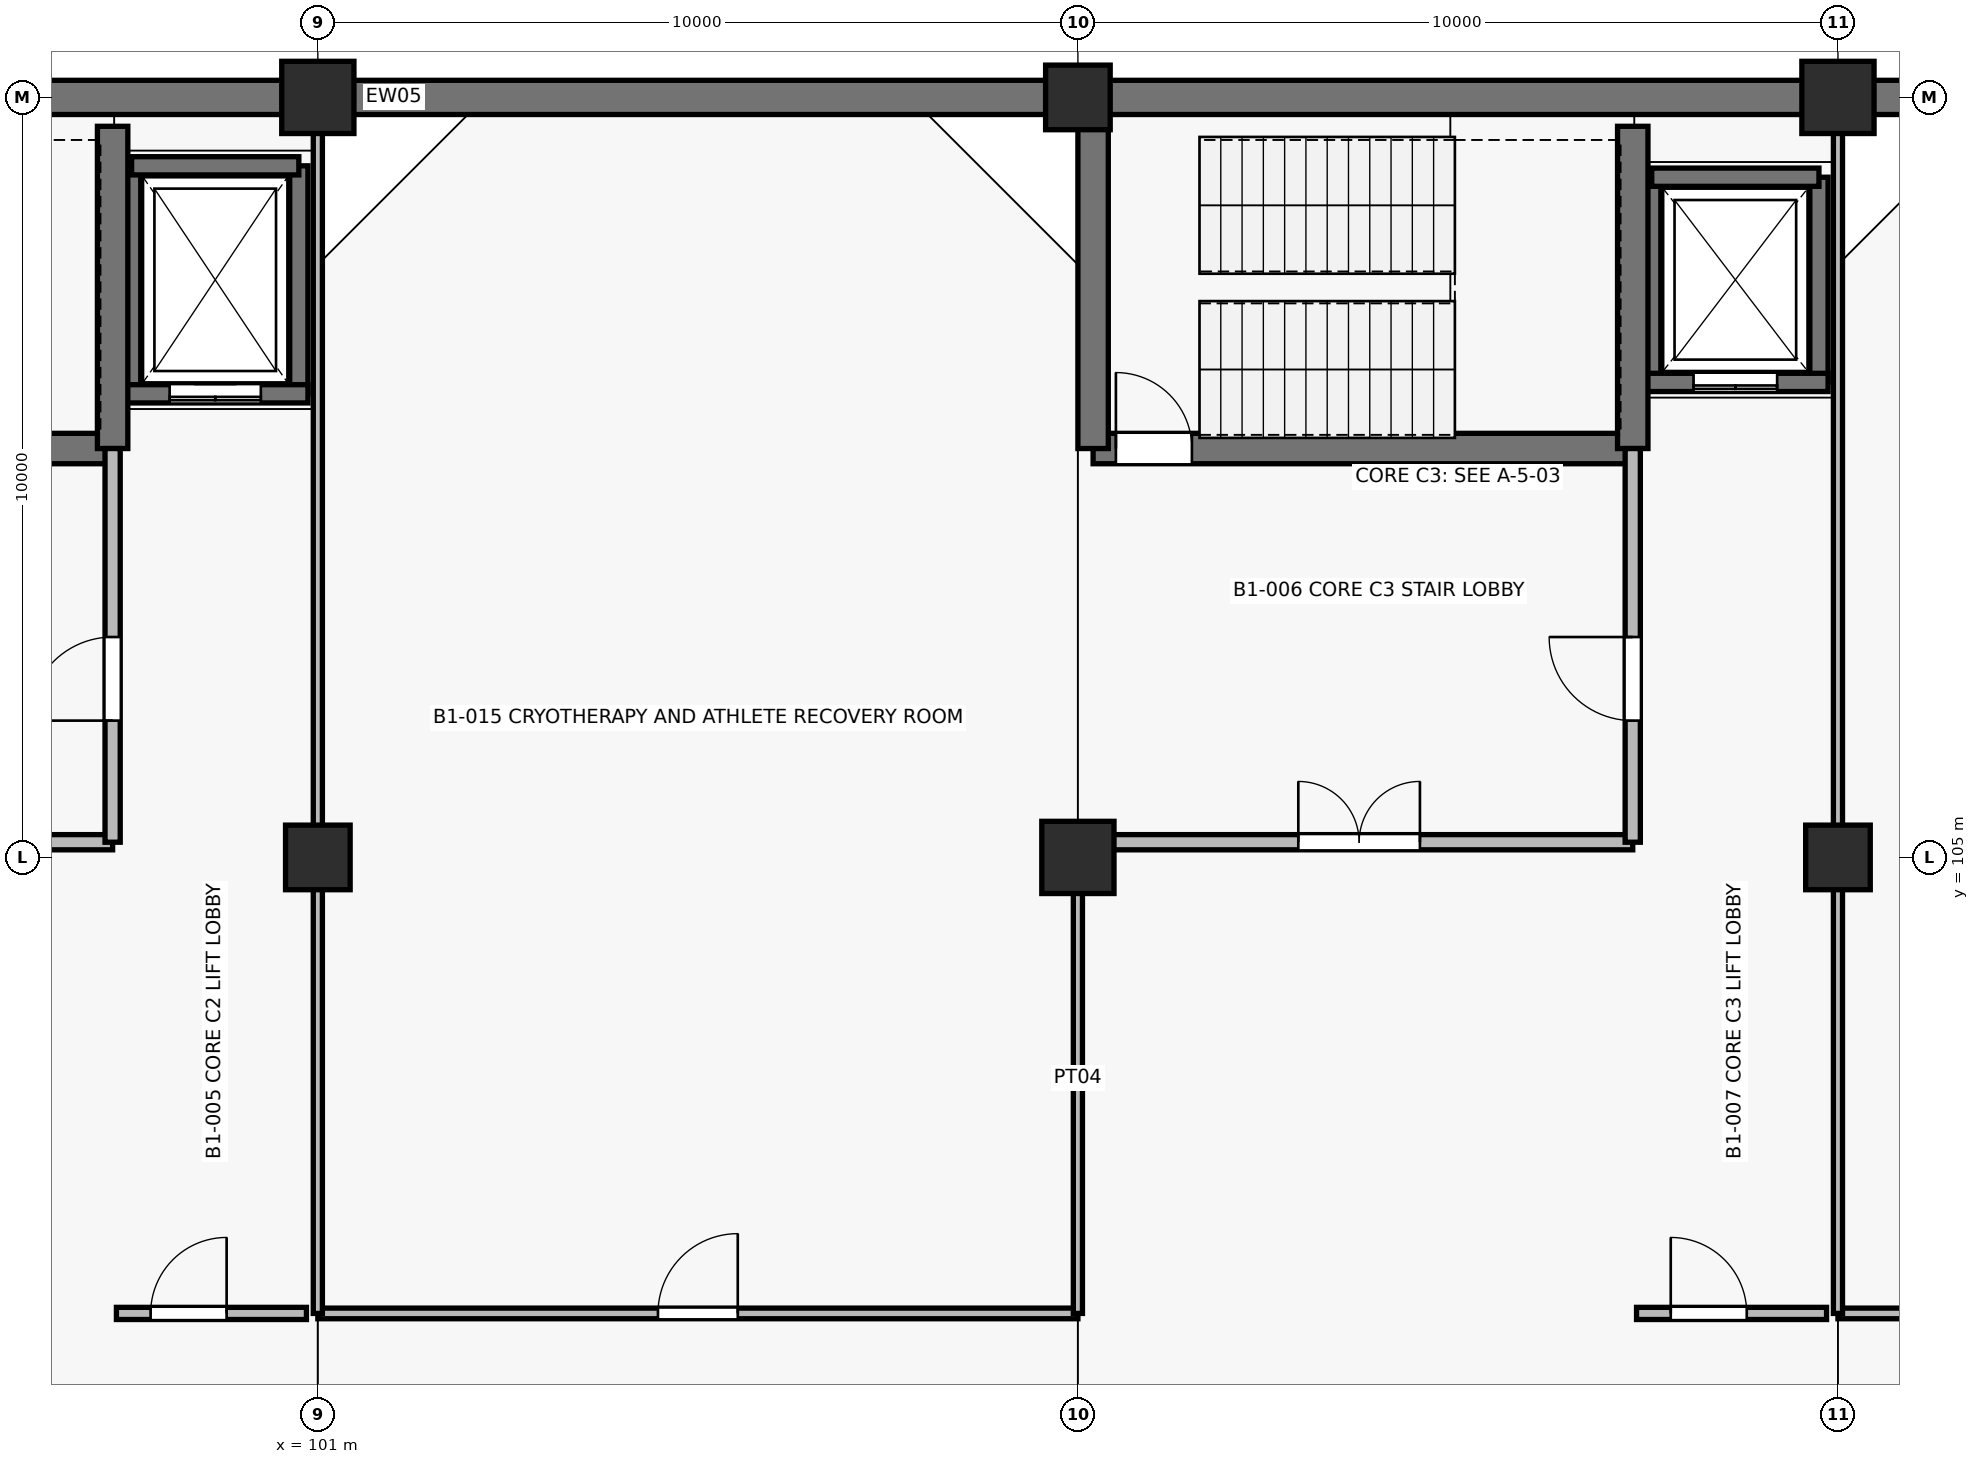
"""IFC4 building model, lengths in metres.
Left out: names, types, materials, properties, quantities, classifications, styles, units other than length and angle.
Written with IfcOpenShell. Run it as: python <this file> out.ifc"""

import sys

from ifc_helpers import new_model, si_unit, direction, frame, frame_2d, origin, origin_2d, place, context, subcontext, project, spatial, rectangle, extrude, element, fill, save


model = new_model("IFC4")
c1 = context("Model", 3, precision=1e-05, world=origin(), true_north=direction((0.0, 1.0)))
c2 = subcontext(c1, "Body", "Model", "MODEL_VIEW")
j1 = project(units=[si_unit("LENGTHUNIT", "METRE"), si_unit("PLANEANGLEUNIT", "RADIAN")], contexts=[c1])
p1 = place(None, origin())
s1 = spatial("IfcSite", under=j1, at=p1, CompositionType="ELEMENT")
p2 = place(p1, origin())
s2 = spatial("IfcBuilding", under=s1, at=p2, CompositionType="ELEMENT")
p3 = place(p2, frame((0.0, 0.0, -4.5)))
s3 = spatial("IfcBuildingStorey", under=s2, at=p3, CompositionType="ELEMENT", Elevation=-4.5)
p4 = place(p3, frame((101.0, 105.0, 0.0), z_axis=(0.0, 0.0, 1.0), x_axis=(1.0, 0.0, 0.0)))
e1 = element("IfcColumn", 1, at=p4, inside=s3, PredefinedType="COLUMN", context=c2, shape_type="SweptSolid", body=[
    extrude(rectangle(XDim=0.85, YDim=0.85, at=origin_2d()), origin(), (0.0, 0.0, 1.0), 4.5),
])
for number, where, z_axis, x_axis in (
    (2, (101.0, 115.0, 0.0), (0.0, 0.0, 1.0), (1.0, 0.0, 0.0)),
    (3, (111.0, 105.0, 0.0), (0.0, 0.0, 1.0), (1.0, 0.0, 0.0)),
):
    element("IfcColumn", number, at=place(p3, frame(where, z_axis=z_axis, x_axis=x_axis)), inside=s3, PredefinedType="COLUMN", context=c2, shape_type="SweptSolid", body=[
        extrude(rectangle(XDim=0.95, YDim=0.95, at=origin_2d()), origin(), (0.0, 0.0, 1.0), 4.5),
    ])
for number, where, z_axis, x_axis in (
    (4, (111.0, 115.0, 0.0), (0.0, 0.0, 1.0), (1.0, 0.0, 0.0)),
    (5, (121.0, 105.0, 0.0), (0.0, 0.0, 1.0), (1.0, 0.0, 0.0)),
):
    element("IfcColumn", number, at=place(p3, frame(where, z_axis=z_axis, x_axis=x_axis)), inside=s3, PredefinedType="COLUMN", context=c2, shape_type="SweptSolid", body=[
        extrude(rectangle(XDim=0.85, YDim=0.85, at=origin_2d()), origin(), (0.0, 0.0, 1.0), 4.5),
    ])
p5 = place(p3, frame((121.0, 115.0, 0.0), z_axis=(0.0, 0.0, 1.0), x_axis=(1.0, 0.0, 0.0)))
e6 = element("IfcColumn", 6, at=p5, inside=s3, PredefinedType="COLUMN", context=c2, shape_type="SweptSolid", body=[
    extrude(rectangle(XDim=0.95, YDim=0.95, at=origin_2d()), origin(), (0.0, 0.0, 1.0), 4.5),
])
p6 = place(p3, frame((43.0, 115.0, 0.0), z_axis=(0.0, 0.0, 1.0), x_axis=(1.0, 0.0, 0.0)))
e7 = element("IfcWall", 7, at=p6, inside=s3, PredefinedType="SOLIDWALL", context=c2, shape_type="SweptSolid", body=[
    extrude(rectangle(XDim=118.0, YDim=0.45, at=frame_2d((59.0, 0.0))), origin(), (0.0, 0.0, 1.0), 4.5),
])
p7 = place(p3, frame((98.55, 111.1, -1.3), z_axis=(0.0, 0.0, 1.0), x_axis=(0.0, 1.0, 0.0)))
e8 = element("IfcWall", 8, at=p7, inside=s3, PredefinedType="SHEAR", context=c2, shape_type="SweptSolid", body=[
    extrude(rectangle(XDim=3.0, YDim=0.24, at=frame_2d((1.5, 0.0))), origin(), (0.0, 0.0, 1.0), 5.8),
])
p8 = place(p3, frame((100.75, 114.1, 0.0), z_axis=(0.0, 0.0, 1.0), x_axis=(0.0, -1.0, 0.0)))
e9 = element("IfcWall", 9, at=p8, inside=s3, PredefinedType="SHEAR", context=c2, shape_type="SweptSolid", body=[
    extrude(rectangle(XDim=3.0, YDim=0.24, at=frame_2d((1.5, 0.0))), origin(), (0.0, 0.0, 1.0), 4.5),
])
p9 = place(p3, frame((98.55, 114.1, 0.0), z_axis=(0.0, 0.0, 1.0), x_axis=(1.0, 0.0, 0.0)))
e10 = element("IfcWall", 10, at=p9, inside=s3, PredefinedType="SHEAR", context=c2, shape_type="SweptSolid", body=[
    extrude(rectangle(XDim=2.2, YDim=0.24, at=frame_2d((1.1, 0.0))), origin(), (0.0, 0.0, 1.0), 4.5),
])
p10 = place(p3, frame((100.87, 111.1, 0.0), z_axis=(0.0, 0.0, 1.0), x_axis=(-1.0, 0.0, 0.0)))
e11 = element("IfcWall", 11, at=p10, inside=s3, PredefinedType="SHEAR", context=c2, shape_type="SweptSolid", body=[
    extrude(rectangle(XDim=2.44, YDim=0.24, at=frame_2d((1.22, 0.0))), origin(), (0.0, 0.0, 1.0), 4.5),
])
p11 = place(p10, frame((0.62, 0.0, 0.0)))
e12 = element("IfcOpeningElement", 12, at=p11, cuts=e11, PredefinedType="OPENING", context=c2, shape_type="SweptSolid", body=[
    extrude(rectangle(XDim=1.2, YDim=2.15, at=frame_2d((0.6, 1.075))), frame((0.0, 0.13, 0.0), z_axis=(0.0, -1.0, 0.0), x_axis=(1.0, 0.0, 0.0)), (0.0, 0.0, 1.0), 0.26),
])
p12 = place(p3, frame((118.55, 111.25, -1.3), z_axis=(0.0, 0.0, 1.0), x_axis=(0.0, 1.0, 0.0)))
e13 = element("IfcWall", 13, at=p12, inside=s3, PredefinedType="SHEAR", context=c2, shape_type="SweptSolid", body=[
    extrude(rectangle(XDim=2.7, YDim=0.24, at=frame_2d((1.35, 0.0))), origin(), (0.0, 0.0, 1.0), 5.8),
])
p13 = place(p3, frame((120.75, 113.95, 0.0), z_axis=(0.0, 0.0, 1.0), x_axis=(0.0, -1.0, 0.0)))
e14 = element("IfcWall", 14, at=p13, inside=s3, PredefinedType="SHEAR", context=c2, shape_type="SweptSolid", body=[
    extrude(rectangle(XDim=2.7, YDim=0.24, at=frame_2d((1.35, 0.0))), origin(), (0.0, 0.0, 1.0), 4.5),
])
p14 = place(p3, frame((118.55, 113.95, 0.0), z_axis=(0.0, 0.0, 1.0), x_axis=(1.0, 0.0, 0.0)))
e15 = element("IfcWall", 15, at=p14, inside=s3, PredefinedType="SHEAR", context=c2, shape_type="SweptSolid", body=[
    extrude(rectangle(XDim=2.2, YDim=0.24, at=frame_2d((1.1, 0.0))), origin(), (0.0, 0.0, 1.0), 4.5),
])
p15 = place(p3, frame((120.87, 111.25, 0.0), z_axis=(0.0, 0.0, 1.0), x_axis=(-1.0, 0.0, 0.0)))
e16 = element("IfcWall", 16, at=p15, inside=s3, PredefinedType="SHEAR", context=c2, shape_type="SweptSolid", body=[
    extrude(rectangle(XDim=2.44, YDim=0.24, at=frame_2d((1.22, 0.0))), origin(), (0.0, 0.0, 1.0), 4.5),
])
p16 = place(p15, frame((0.67, 0.0, 0.0)))
e17 = element("IfcOpeningElement", 17, at=p16, cuts=e16, PredefinedType="OPENING", context=c2, shape_type="SweptSolid", body=[
    extrude(rectangle(XDim=1.1, YDim=2.15, at=frame_2d((0.55, 1.075))), frame((0.0, 0.13, 0.0), z_axis=(0.0, -1.0, 0.0), x_axis=(1.0, 0.0, 0.0)), (0.0, 0.0, 1.0), 0.26),
])
p17 = place(p3, frame((91.2, 110.38, 0.0), z_axis=(0.0, 0.0, 1.0), x_axis=(1.0, 0.0, 0.0)))
e18 = element("IfcWall", 18, at=p17, inside=s3, PredefinedType="SHEAR", context=c2, shape_type="SweptSolid", body=[
    extrude(rectangle(XDim=7.1, YDim=0.4, at=frame_2d((3.55, 0.0))), origin(), (0.0, 0.0, 1.0), 4.5),
])
p18 = place(p17, frame((0.3, 0.0, 0.0)))
e19 = element("IfcOpeningElement", 19, at=p18, cuts=e18, PredefinedType="OPENING", context=c2, shape_type="SweptSolid", body=[
    extrude(rectangle(XDim=1.0, YDim=2.15, at=frame_2d((0.5, 1.075))), frame((0.0, 0.21, 0.0), z_axis=(0.0, -1.0, 0.0), x_axis=(1.0, 0.0, 0.0)), (0.0, 0.0, 1.0), 0.42),
])
p19 = place(p3, frame((98.3, 110.38, 0.0), z_axis=(0.0, 0.0, 1.0), x_axis=(0.0, 1.0, 0.0)))
e20 = element("IfcWall", 20, at=p19, inside=s3, PredefinedType="SHEAR", context=c2, shape_type="SweptSolid", body=[
    extrude(rectangle(XDim=4.24, YDim=0.4, at=frame_2d((2.12, 0.0))), origin(), (0.0, 0.0, 1.0), 4.5),
])
p20 = place(p3, frame((91.2, 105.2, 0.0), z_axis=(0.0, 0.0, 1.0), x_axis=(1.0, 0.0, 0.0)))
e21 = element("IfcWall", 21, at=p20, inside=s3, PredefinedType="PARTITIONING", context=c2, shape_type="SweptSolid", body=[
    extrude(rectangle(XDim=7.1, YDim=0.2, at=frame_2d((3.55, 0.0))), origin(), (0.0, 0.0, 1.0), 3.175),
])
p21 = place(p20, frame((2.7, 0.0, 0.0)))
e22 = element("IfcOpeningElement", 22, at=p21, cuts=e21, PredefinedType="OPENING", context=c2, shape_type="SweptSolid", body=[
    extrude(rectangle(XDim=1.6, YDim=2.2, at=frame_2d((0.8, 1.1))), frame((0.0, 0.11, 0.0), z_axis=(0.0, -1.0, 0.0), x_axis=(1.0, 0.0, 0.0)), (0.0, 0.0, 1.0), 0.22),
])
p22 = place(p3, frame((98.3, 105.2, 0.0), z_axis=(0.0, 0.0, 1.0), x_axis=(0.0, 1.0, 0.0)))
e23 = element("IfcWall", 23, at=p22, inside=s3, PredefinedType="PARTITIONING", context=c2, shape_type="SweptSolid", body=[
    extrude(rectangle(XDim=5.18, YDim=0.2, at=frame_2d((2.59, 0.0))), origin(), (0.0, 0.0, 1.0), 3.175),
])
p23 = place(p22, frame((1.6, 0.0, 0.0)))
e24 = element("IfcOpeningElement", 24, at=p23, cuts=e23, PredefinedType="OPENING", context=c2, shape_type="SweptSolid", body=[
    extrude(rectangle(XDim=1.1, YDim=2.15, at=frame_2d((0.55, 1.075))), frame((0.0, 0.11, 0.0), z_axis=(0.0, -1.0, 0.0), x_axis=(1.0, 0.0, 0.0)), (0.0, 0.0, 1.0), 0.22),
])
p24 = place(p3, frame((98.35, 99.0, 0.0), z_axis=(0.0, 0.0, 1.0), x_axis=(1.0, 0.0, 0.0)))
e25 = element("IfcWall", 25, at=p24, inside=s3, PredefinedType="PARTITIONING", context=c2, shape_type="SweptSolid", body=[
    extrude(rectangle(XDim=2.5, YDim=0.16, at=frame_2d((1.25, 0.0))), origin(), (0.0, 0.0, 1.0), 3.275),
])
p25 = place(p24, frame((0.45, 0.0, 0.0)))
e26 = element("IfcOpeningElement", 26, at=p25, cuts=e25, PredefinedType="OPENING", context=c2, shape_type="SweptSolid", body=[
    extrude(rectangle(XDim=1.0, YDim=2.15, at=frame_2d((0.5, 1.075))), frame((0.0, 0.09, 0.0), z_axis=(0.0, -1.0, 0.0), x_axis=(1.0, 0.0, 0.0)), (0.0, 0.0, 1.0), 0.18),
])
p26 = place(p3, frame((111.2, 110.38, 0.0), z_axis=(0.0, 0.0, 1.0), x_axis=(1.0, 0.0, 0.0)))
e27 = element("IfcWall", 27, at=p26, inside=s3, PredefinedType="SHEAR", context=c2, shape_type="SweptSolid", body=[
    extrude(rectangle(XDim=7.1, YDim=0.4, at=frame_2d((3.55, 0.0))), origin(), (0.0, 0.0, 1.0), 4.5),
])
p27 = place(p26, frame((0.3, 0.0, 0.0)))
e28 = element("IfcOpeningElement", 28, at=p27, cuts=e27, PredefinedType="OPENING", context=c2, shape_type="SweptSolid", body=[
    extrude(rectangle(XDim=1.0, YDim=2.15, at=frame_2d((0.5, 1.075))), frame((0.0, 0.21, 0.0), z_axis=(0.0, -1.0, 0.0), x_axis=(1.0, 0.0, 0.0)), (0.0, 0.0, 1.0), 0.42),
])
for number, where, z_axis, x_axis in (
    (29, (118.3, 110.38, 0.0), (0.0, 0.0, 1.0), (0.0, 1.0, 0.0)),
    (30, (111.2, 114.62, 0.0), (0.0, 0.0, 1.0), (0.0, -1.0, 0.0)),
):
    element("IfcWall", number, at=place(p3, frame(where, z_axis=z_axis, x_axis=x_axis)), inside=s3, PredefinedType="SHEAR", context=c2, shape_type="SweptSolid", body=[
        extrude(rectangle(XDim=4.24, YDim=0.4, at=frame_2d((2.12, 0.0))), origin(), (0.0, 0.0, 1.0), 4.5),
    ])
p28 = place(p3, frame((111.2, 105.2, 0.0), z_axis=(0.0, 0.0, 1.0), x_axis=(1.0, 0.0, 0.0)))
e31 = element("IfcWall", 31, at=p28, inside=s3, PredefinedType="PARTITIONING", context=c2, shape_type="SweptSolid", body=[
    extrude(rectangle(XDim=7.1, YDim=0.2, at=frame_2d((3.55, 0.0))), origin(), (0.0, 0.0, 1.0), 3.175),
])
p29 = place(p28, frame((2.7, 0.0, 0.0)))
e32 = element("IfcOpeningElement", 32, at=p29, cuts=e31, PredefinedType="OPENING", context=c2, shape_type="SweptSolid", body=[
    extrude(rectangle(XDim=1.6, YDim=2.2, at=frame_2d((0.8, 1.1))), frame((0.0, 0.11, 0.0), z_axis=(0.0, -1.0, 0.0), x_axis=(1.0, 0.0, 0.0)), (0.0, 0.0, 1.0), 0.22),
])
p30 = place(p3, frame((118.3, 105.2, 0.0), z_axis=(0.0, 0.0, 1.0), x_axis=(0.0, 1.0, 0.0)))
e33 = element("IfcWall", 33, at=p30, inside=s3, PredefinedType="PARTITIONING", context=c2, shape_type="SweptSolid", body=[
    extrude(rectangle(XDim=5.18, YDim=0.2, at=frame_2d((2.59, 0.0))), origin(), (0.0, 0.0, 1.0), 3.175),
])
p31 = place(p30, frame((1.6, 0.0, 0.0)))
e34 = element("IfcOpeningElement", 34, at=p31, cuts=e33, PredefinedType="OPENING", context=c2, shape_type="SweptSolid", body=[
    extrude(rectangle(XDim=1.1, YDim=2.15, at=frame_2d((0.55, 1.075))), frame((0.0, 0.11, 0.0), z_axis=(0.0, -1.0, 0.0), x_axis=(1.0, 0.0, 0.0)), (0.0, 0.0, 1.0), 0.22),
])
p32 = place(p3, frame((118.35, 99.0, 0.0), z_axis=(0.0, 0.0, 1.0), x_axis=(1.0, 0.0, 0.0)))
e35 = element("IfcWall", 35, at=p32, inside=s3, PredefinedType="PARTITIONING", context=c2, shape_type="SweptSolid", body=[
    extrude(rectangle(XDim=2.5, YDim=0.16, at=frame_2d((1.25, 0.0))), origin(), (0.0, 0.0, 1.0), 3.275),
])
p33 = place(p32, frame((0.45, 0.0, 0.0)))
e36 = element("IfcOpeningElement", 36, at=p33, cuts=e35, PredefinedType="OPENING", context=c2, shape_type="SweptSolid", body=[
    extrude(rectangle(XDim=1.0, YDim=2.15, at=frame_2d((0.5, 1.075))), frame((0.0, 0.09, 0.0), z_axis=(0.0, -1.0, 0.0), x_axis=(1.0, 0.0, 0.0)), (0.0, 0.0, 1.0), 0.18),
])
p34 = place(p3, frame((101.0, 99.0, 0.0), z_axis=(0.0, 0.0, 1.0), x_axis=(1.0, 0.0, 0.0)))
e37 = element("IfcWall", 37, at=p34, inside=s3, PredefinedType="PARTITIONING", context=c2, shape_type="SweptSolid", body=[
    extrude(rectangle(XDim=10.0, YDim=0.14, at=frame_2d((5.0, 0.0))), origin(), (0.0, 0.0, 1.0), 3.275),
])
p35 = place(p34, frame((4.475, 0.0, 0.0)))
e38 = element("IfcOpeningElement", 38, at=p35, cuts=e37, PredefinedType="OPENING", context=c2, shape_type="SweptSolid", body=[
    extrude(rectangle(XDim=1.05, YDim=2.1, at=frame_2d((0.525, 1.05))), frame((0.0, 0.08, 0.0), z_axis=(0.0, -1.0, 0.0), x_axis=(1.0, 0.0, 0.0)), (0.0, 0.0, 1.0), 0.16),
])
p36 = place(p3, frame((101.0, 99.0, 0.0), z_axis=(0.0, 0.0, 1.0), x_axis=(0.0, 1.0, 0.0)))
e39 = element("IfcWall", 39, at=p36, inside=s3, PredefinedType="PARTITIONING", context=c2, shape_type="SweptSolid", body=[
    extrude(rectangle(XDim=15.75, YDim=0.12, at=frame_2d((7.875, 0.0))), origin(), (0.0, 0.0, 1.0), 3.175),
])
p37 = place(p3, frame((111.0, 99.0, 0.0), z_axis=(0.0, 0.0, 1.0), x_axis=(0.0, 1.0, 0.0)))
e40 = element("IfcWall", 40, at=p37, inside=s3, PredefinedType="PARTITIONING", context=c2, shape_type="SweptSolid", body=[
    extrude(rectangle(XDim=6.2, YDim=0.12, at=frame_2d((3.1, 0.0))), origin(), (0.0, 0.0, 1.0), 3.175),
])
p38 = place(p3, frame((121.0, 99.0, 0.0), z_axis=(0.0, 0.0, 1.0), x_axis=(1.0, 0.0, 0.0)))
e41 = element("IfcWall", 41, at=p38, inside=s3, PredefinedType="PARTITIONING", context=c2, shape_type="SweptSolid", body=[
    extrude(rectangle(XDim=4.2, YDim=0.14, at=frame_2d((2.1, 0.0))), origin(), (0.0, 0.0, 1.0), 3.275),
])
p39 = place(p38, frame((1.61, 0.0, 0.0)))
e42 = element("IfcOpeningElement", 42, at=p39, cuts=e41, PredefinedType="OPENING", context=c2, shape_type="SweptSolid", body=[
    extrude(rectangle(XDim=0.98, YDim=2.1, at=frame_2d((0.49, 1.05))), frame((0.0, 0.08, 0.0), z_axis=(0.0, -1.0, 0.0), x_axis=(1.0, 0.0, 0.0)), (0.0, 0.0, 1.0), 0.16),
])
p40 = place(p3, frame((121.0, 99.0, 0.0), z_axis=(0.0, 0.0, 1.0), x_axis=(0.0, 1.0, 0.0)))
e43 = element("IfcWall", 43, at=p40, inside=s3, PredefinedType="PARTITIONING", context=c2, shape_type="SweptSolid", body=[
    extrude(rectangle(XDim=15.75, YDim=0.12, at=frame_2d((7.875, 0.0))), origin(), (0.0, 0.0, 1.0), 3.175),
])
p41 = place(p11, origin())
e44 = element("IfcDoor", 44, at=p41, inside=s3, OperationType="DOUBLE_DOOR_SLIDING", PredefinedType="USERDEFINED", context=c2, shape_type="SweptSolid", body=[
    extrude(rectangle(XDim=1.2, YDim=2.15, at=frame_2d((0.6, 1.075))), frame((0.0, 0.025, 0.0), z_axis=(0.0, -1.0, 0.0), x_axis=(1.0, 0.0, 0.0)), (0.0, 0.0, 1.0), 0.05),
])
fill(e12, e44)
p42 = place(p16, origin())
e45 = element("IfcDoor", 45, at=p42, inside=s3, OperationType="DOUBLE_DOOR_SLIDING", PredefinedType="USERDEFINED", context=c2, shape_type="SweptSolid", body=[
    extrude(rectangle(XDim=1.1, YDim=2.15, at=frame_2d((0.55, 1.075))), frame((0.0, 0.025, 0.0), z_axis=(0.0, -1.0, 0.0), x_axis=(1.0, 0.0, 0.0)), (0.0, 0.0, 1.0), 0.05),
])
fill(e17, e45)
p43 = place(p23, origin())
e46 = element("IfcDoor", 46, at=p43, inside=s3, OperationType="SINGLE_SWING_LEFT", PredefinedType="DOOR", context=c2, shape_type="SweptSolid", body=[
    extrude(rectangle(XDim=1.1, YDim=2.15, at=frame_2d((0.55, 1.075))), frame((0.0, 0.025, 0.0), z_axis=(0.0, -1.0, 0.0), x_axis=(1.0, 0.0, 0.0)), (0.0, 0.0, 1.0), 0.05),
])
fill(e24, e46)
p44 = place(p25, origin())
e47 = element("IfcDoor", 47, at=p44, inside=s3, OperationType="SINGLE_SWING_RIGHT", PredefinedType="DOOR", context=c2, shape_type="SweptSolid", body=[
    extrude(rectangle(XDim=1.0, YDim=2.15, at=frame_2d((0.5, 1.075))), frame((0.0, 0.025, 0.0), z_axis=(0.0, -1.0, 0.0), x_axis=(1.0, 0.0, 0.0)), (0.0, 0.0, 1.0), 0.05),
])
fill(e26, e47)
p45 = place(p27, origin())
e48 = element("IfcDoor", 48, at=p45, inside=s3, OperationType="SINGLE_SWING_LEFT", PredefinedType="DOOR", context=c2, shape_type="SweptSolid", body=[
    extrude(rectangle(XDim=1.0, YDim=2.15, at=frame_2d((0.5, 1.075))), frame((0.0, 0.025, 0.0), z_axis=(0.0, -1.0, 0.0), x_axis=(1.0, 0.0, 0.0)), (0.0, 0.0, 1.0), 0.05),
])
fill(e28, e48)
p46 = place(p29, origin())
e49 = element("IfcDoor", 49, at=p46, inside=s3, OperationType="DOUBLE_DOOR_SINGLE_SWING", PredefinedType="DOOR", context=c2, shape_type="SweptSolid", body=[
    extrude(rectangle(XDim=1.6, YDim=2.2, at=frame_2d((0.8, 1.1))), frame((0.0, 0.025, 0.0), z_axis=(0.0, -1.0, 0.0), x_axis=(1.0, 0.0, 0.0)), (0.0, 0.0, 1.0), 0.05),
])
fill(e32, e49)
p47 = place(p31, origin())
e50 = element("IfcDoor", 50, at=p47, inside=s3, OperationType="SINGLE_SWING_RIGHT", PredefinedType="DOOR", context=c2, shape_type="SweptSolid", body=[
    extrude(rectangle(XDim=1.1, YDim=2.15, at=frame_2d((0.55, 1.075))), frame((0.0, 0.025, 0.0), z_axis=(0.0, -1.0, 0.0), x_axis=(1.0, 0.0, 0.0)), (0.0, 0.0, 1.0), 0.05),
])
fill(e34, e50)
p48 = place(p33, origin())
e51 = element("IfcDoor", 51, at=p48, inside=s3, OperationType="SINGLE_SWING_LEFT", PredefinedType="DOOR", context=c2, shape_type="SweptSolid", body=[
    extrude(rectangle(XDim=1.0, YDim=2.15, at=frame_2d((0.5, 1.075))), frame((0.0, 0.025, 0.0), z_axis=(0.0, -1.0, 0.0), x_axis=(1.0, 0.0, 0.0)), (0.0, 0.0, 1.0), 0.05),
])
fill(e36, e51)
p49 = place(p35, origin())
e52 = element("IfcDoor", 52, at=p49, inside=s3, OperationType="SINGLE_SWING_RIGHT", PredefinedType="DOOR", context=c2, shape_type="SweptSolid", body=[
    extrude(rectangle(XDim=1.05, YDim=2.1, at=frame_2d((0.525, 1.05))), frame((0.0, 0.025, 0.0), z_axis=(0.0, -1.0, 0.0), x_axis=(1.0, 0.0, 0.0)), (0.0, 0.0, 1.0), 0.05),
])
fill(e38, e52)
save(model, sys.argv[1])
